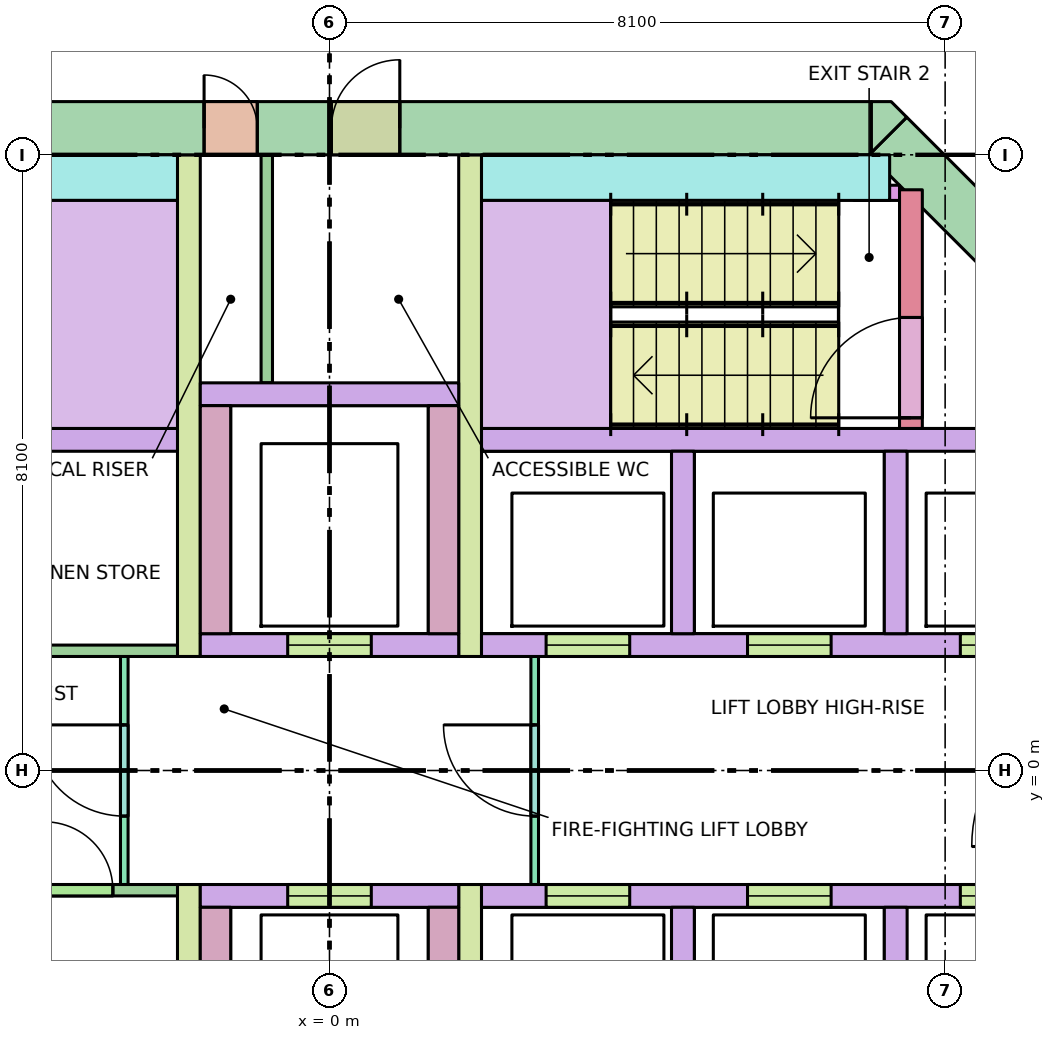
"""IFC4 building model, lengths in metres.
Left out: names, types, materials, properties, quantities, classifications, styles, units other than length and angle.
Written with IfcOpenShell. Run it as: python <this file> out.ifc"""

import sys

from ifc_helpers import new_model, si_unit, direction, frame, frame_2d, origin, place, context, subcontext, project, spatial, polyline, rectangle, outline, extrude, element, fill, save


model = new_model("IFC4")
c1 = context("Model", 3, precision=1e-05, world=origin(), true_north=direction((0.0, 1.0)))
c2 = subcontext(c1, "Body", "Model", "MODEL_VIEW")
j1 = project(units=[si_unit("LENGTHUNIT", "METRE"), si_unit("PLANEANGLEUNIT", "RADIAN")], contexts=[c1])
p1 = place(None, origin())
s1 = spatial("IfcSite", under=j1, at=p1, CompositionType="ELEMENT")
p2 = place(p1, origin())
s2 = spatial("IfcBuilding", under=s1, at=p2, CompositionType="ELEMENT")
p3 = place(p2, frame((0.0, 0.0, 226.1)))
s3 = spatial("IfcBuildingStorey", under=s2, at=p3, CompositionType="ELEMENT", Elevation=226.1)
p4 = place(p3, frame((-7.13, 8.45, -0.28), z_axis=(0.0, 0.0, 1.0), x_axis=(1.0, 0.0, 0.0)))
e1 = element("IfcWall", 1, at=p4, inside=s3, PredefinedType="SHEAR", context=c2, shape_type="SweptSolid", body=[
    extrude(rectangle(XDim=14.26, YDim=0.7, at=frame_2d((7.13, 0.0))), origin(), (0.0, 0.0, 1.0), 3.7),
])
p5 = place(p4, frame((5.48, 0.0, 0.28)))
e2 = element("IfcOpeningElement", 2, at=p5, cuts=e1, PredefinedType="OPENING", context=c2, shape_type="SweptSolid", body=[
    extrude(rectangle(XDim=0.7, YDim=2.1, at=frame_2d((0.35, 1.05))), frame((0.0, 0.36, 0.0), z_axis=(0.0, -1.0, 0.0), x_axis=(1.0, 0.0, 0.0)), (0.0, 0.0, 1.0), 0.72),
])
p6 = place(p4, frame((7.155, 0.0, 0.28)))
e3 = element("IfcOpeningElement", 3, at=p6, cuts=e1, PredefinedType="OPENING", context=c2, shape_type="SweptSolid", body=[
    extrude(rectangle(XDim=0.9, YDim=2.1, at=frame_2d((0.45, 1.05))), frame((0.0, 0.36, 0.0), z_axis=(0.0, -1.0, 0.0), x_axis=(1.0, 0.0, 0.0)), (0.0, 0.0, 1.0), 0.72),
])
p7 = place(p3, frame((7.347, 8.347, -0.28), z_axis=(0.0, 0.0, 1.0), x_axis=(0.707106781187, -0.707106781187, 0.0)))
e4 = element("IfcWall", 4, at=p7, inside=s3, PredefinedType="SHEAR", context=c2, shape_type="SweptSolid", body=[
    extrude(rectangle(XDim=4.243, YDim=0.7, at=frame_2d((2.121, 0.0))), origin(), (0.0, 0.0, 1.0), 3.7),
])
p8 = place(p7, frame((2.393, 0.0, 0.28)))
e5 = element("IfcOpeningElement", 5, at=p8, cuts=e4, PredefinedType="OPENING", context=c2, shape_type="SweptSolid", body=[
    extrude(rectangle(XDim=1.2, YDim=2.1, at=frame_2d((0.6, 1.05))), frame((0.0, 0.36, 0.0), z_axis=(0.0, -1.0, 0.0), x_axis=(1.0, 0.0, 0.0)), (0.0, 0.0, 1.0), 0.72),
])
p9 = place(p3, frame((0.0, 0.0, -0.28)))
e6 = element("IfcWall", 6, at=p9, inside=s3, PredefinedType="SHEAR", context=c2, shape_type="SweptSolid", body=[
    extrude(outline(polyline([(7.39, 8.8), (7.595, 8.595), (7.595, 8.595), (7.595, 8.595), (7.13, 8.13), (7.13, 8.8), (7.13, 8.8), (7.39, 8.8)])), origin(), (0.0, 0.0, 1.0), 3.7),
])
for number, where, z_axis, x_axis in (
    (7, (-10.1, 4.35, 0.0), (0.0, 0.0, 1.0), (1.0, 0.0, 0.0)),
    (8, (2.0, 4.35, 0.0), (0.0, 0.0, 1.0), (1.0, 0.0, 0.0)),
):
    element("IfcWall", number, at=place(p3, frame(where, z_axis=z_axis, x_axis=x_axis)), inside=s3, PredefinedType="SOLIDWALL", context=c2, shape_type="SweptSolid", body=[
        extrude(rectangle(XDim=8.1, YDim=0.3, at=frame_2d((4.05, 0.0))), origin(), (0.0, 0.0, 1.0), 3.42),
    ])
p10 = place(p3, frame((2.0, 1.65, 0.0), z_axis=(0.0, 0.0, 1.0), x_axis=(1.0, 0.0, 0.0)))
e9 = element("IfcWall", 9, at=p10, inside=s3, PredefinedType="SOLIDWALL", context=c2, shape_type="SweptSolid", body=[
    extrude(rectangle(XDim=8.1, YDim=0.3, at=frame_2d((4.05, 0.0))), origin(), (0.0, 0.0, 1.0), 3.42),
])
p11 = place(p10, frame((0.85, 0.0, 0.0)))
e10 = element("IfcOpeningElement", 10, at=p11, cuts=e9, PredefinedType="OPENING", context=c2, shape_type="SweptSolid", body=[
    extrude(rectangle(XDim=1.1, YDim=2.1, at=frame_2d((0.55, 1.05))), frame((0.0, 0.16, 0.0), z_axis=(0.0, -1.0, 0.0), x_axis=(1.0, 0.0, 0.0)), (0.0, 0.0, 1.0), 0.32),
])
p12 = place(p10, frame((3.5, 0.0, 0.0)))
e11 = element("IfcOpeningElement", 11, at=p12, cuts=e9, PredefinedType="OPENING", context=c2, shape_type="SweptSolid", body=[
    extrude(rectangle(XDim=1.1, YDim=2.1, at=frame_2d((0.55, 1.05))), frame((0.0, 0.16, 0.0), z_axis=(0.0, -1.0, 0.0), x_axis=(1.0, 0.0, 0.0)), (0.0, 0.0, 1.0), 0.32),
])
p13 = place(p10, frame((6.3, 0.0, 0.0)))
e12 = element("IfcOpeningElement", 12, at=p13, cuts=e9, PredefinedType="OPENING", context=c2, shape_type="SweptSolid", body=[
    extrude(rectangle(XDim=1.1, YDim=2.1, at=frame_2d((0.55, 1.05))), frame((0.0, 0.16, 0.0), z_axis=(0.0, -1.0, 0.0), x_axis=(1.0, 0.0, 0.0)), (0.0, 0.0, 1.0), 0.32),
])
p14 = place(p3, frame((2.0, -1.65, 0.0), z_axis=(0.0, 0.0, 1.0), x_axis=(1.0, 0.0, 0.0)))
e13 = element("IfcWall", 13, at=p14, inside=s3, PredefinedType="SOLIDWALL", context=c2, shape_type="SweptSolid", body=[
    extrude(rectangle(XDim=8.1, YDim=0.3, at=frame_2d((4.05, 0.0))), origin(), (0.0, 0.0, 1.0), 3.42),
])
p15 = place(p14, frame((0.85, 0.0, 0.0)))
e14 = element("IfcOpeningElement", 14, at=p15, cuts=e13, PredefinedType="OPENING", context=c2, shape_type="SweptSolid", body=[
    extrude(rectangle(XDim=1.1, YDim=2.1, at=frame_2d((0.55, 1.05))), frame((0.0, 0.16, 0.0), z_axis=(0.0, -1.0, 0.0), x_axis=(1.0, 0.0, 0.0)), (0.0, 0.0, 1.0), 0.32),
])
p16 = place(p14, frame((3.5, 0.0, 0.0)))
e15 = element("IfcOpeningElement", 15, at=p16, cuts=e13, PredefinedType="OPENING", context=c2, shape_type="SweptSolid", body=[
    extrude(rectangle(XDim=1.1, YDim=2.1, at=frame_2d((0.55, 1.05))), frame((0.0, 0.16, 0.0), z_axis=(0.0, -1.0, 0.0), x_axis=(1.0, 0.0, 0.0)), (0.0, 0.0, 1.0), 0.32),
])
p17 = place(p14, frame((6.3, 0.0, 0.0)))
e16 = element("IfcOpeningElement", 16, at=p17, cuts=e13, PredefinedType="OPENING", context=c2, shape_type="SweptSolid", body=[
    extrude(rectangle(XDim=1.1, YDim=2.1, at=frame_2d((0.55, 1.05))), frame((0.0, 0.16, 0.0), z_axis=(0.0, -1.0, 0.0), x_axis=(1.0, 0.0, 0.0)), (0.0, 0.0, 1.0), 0.32),
])
for number, where, z_axis, x_axis in (
    (17, (4.65, 1.8, 0.0), (0.0, 0.0, 1.0), (0.0, 1.0, 0.0)),
    (18, (4.65, -4.2, 0.0), (0.0, 0.0, 1.0), (0.0, 1.0, 0.0)),
    (19, (7.45, 1.8, 0.0), (0.0, 0.0, 1.0), (0.0, 1.0, 0.0)),
    (20, (7.45, -4.2, 0.0), (0.0, 0.0, 1.0), (0.0, 1.0, 0.0)),
):
    element("IfcWall", number, at=place(p3, frame(where, z_axis=z_axis, x_axis=x_axis)), inside=s3, PredefinedType="SOLIDWALL", context=c2, shape_type="SweptSolid", body=[
        extrude(rectangle(XDim=2.4, YDim=0.3, at=frame_2d((1.2, 0.0))), origin(), (0.0, 0.0, 1.0), 3.42),
    ])
for number, where, z_axis, x_axis in (
    (21, (-1.85, 1.5, 0.0), (0.0, 0.0, 1.0), (0.0, 1.0, 0.0)),
    (22, (-1.85, -8.1, 0.0), (0.0, 0.0, 1.0), (0.0, 1.0, 0.0)),
    (23, (1.85, 1.5, 0.0), (0.0, 0.0, 1.0), (0.0, 1.0, 0.0)),
    (24, (1.85, -8.1, 0.0), (0.0, 0.0, 1.0), (0.0, 1.0, 0.0)),
):
    element("IfcWall", number, at=place(p3, frame(where, z_axis=z_axis, x_axis=x_axis)), inside=s3, PredefinedType="SHEAR", context=c2, shape_type="SweptSolid", body=[
        extrude(rectangle(XDim=6.6, YDim=0.3, at=frame_2d((3.3, 0.0))), origin(), (0.0, 0.0, 1.0), 3.42),
    ])
p18 = place(p3, frame((-1.7, 1.65, 0.0), z_axis=(0.0, 0.0, 1.0), x_axis=(1.0, 0.0, 0.0)))
e25 = element("IfcWall", 25, at=p18, inside=s3, PredefinedType="SOLIDWALL", context=c2, shape_type="SweptSolid", body=[
    extrude(rectangle(XDim=3.4, YDim=0.3, at=frame_2d((1.7, 0.0))), origin(), (0.0, 0.0, 1.0), 3.42),
])
p19 = place(p18, frame((1.15, 0.0, 0.0)))
e26 = element("IfcOpeningElement", 26, at=p19, cuts=e25, PredefinedType="OPENING", context=c2, shape_type="SweptSolid", body=[
    extrude(rectangle(XDim=1.1, YDim=2.1, at=frame_2d((0.55, 1.05))), frame((0.0, 0.16, 0.0), z_axis=(0.0, -1.0, 0.0), x_axis=(1.0, 0.0, 0.0)), (0.0, 0.0, 1.0), 0.32),
])
p20 = place(p3, frame((-1.7, -1.65, 0.0), z_axis=(0.0, 0.0, 1.0), x_axis=(1.0, 0.0, 0.0)))
e27 = element("IfcWall", 27, at=p20, inside=s3, PredefinedType="SOLIDWALL", context=c2, shape_type="SweptSolid", body=[
    extrude(rectangle(XDim=3.4, YDim=0.3, at=frame_2d((1.7, 0.0))), origin(), (0.0, 0.0, 1.0), 3.42),
])
p21 = place(p20, frame((1.15, 0.0, 0.0)))
e28 = element("IfcOpeningElement", 28, at=p21, cuts=e27, PredefinedType="OPENING", context=c2, shape_type="SweptSolid", body=[
    extrude(rectangle(XDim=1.1, YDim=2.1, at=frame_2d((0.55, 1.05))), frame((0.0, 0.16, 0.0), z_axis=(0.0, -1.0, 0.0), x_axis=(1.0, 0.0, 0.0)), (0.0, 0.0, 1.0), 0.32),
])
for number, where, z_axis, x_axis in (
    (29, (-1.5, 1.8, 0.0), (0.0, 0.0, 1.0), (0.0, 1.0, 0.0)),
    (30, (-1.5, -4.8, 0.0), (0.0, 0.0, 1.0), (0.0, 1.0, 0.0)),
    (31, (1.5, 1.8, 0.0), (0.0, 0.0, 1.0), (0.0, 1.0, 0.0)),
    (32, (1.5, -4.8, 0.0), (0.0, 0.0, 1.0), (0.0, 1.0, 0.0)),
):
    element("IfcWall", number, at=place(p3, frame(where, z_axis=z_axis, x_axis=x_axis)), inside=s3, PredefinedType="SOLIDWALL", context=c2, shape_type="SweptSolid", body=[
        extrude(rectangle(XDim=3.0, YDim=0.4, at=frame_2d((1.5, 0.0))), origin(), (0.0, 0.0, 1.0), 3.42),
    ])
p22 = place(p3, frame((-1.7, 4.95, 0.0), z_axis=(0.0, 0.0, 1.0), x_axis=(1.0, 0.0, 0.0)))
e33 = element("IfcWall", 33, at=p22, inside=s3, PredefinedType="SOLIDWALL", context=c2, shape_type="SweptSolid", body=[
    extrude(rectangle(XDim=3.4, YDim=0.3, at=frame_2d((1.7, 0.0))), origin(), (0.0, 0.0, 1.0), 3.42),
])
p23 = place(p3, frame((-7.37, 7.8, 0.0), z_axis=(0.0, 0.0, 1.0), x_axis=(1.0, 0.0, 0.0)))
e34 = element("IfcWall", 34, at=p23, inside=s3, PredefinedType="SHEAR", context=c2, shape_type="SweptSolid", body=[
    extrude(rectangle(XDim=5.37, YDim=0.6, at=frame_2d((2.685, 0.0))), origin(), (0.0, 0.0, 1.0), 3.42),
])
p24 = place(p3, frame((7.65, 4.5, 0.0), z_axis=(0.0, 0.0, 1.0), x_axis=(0.0, 1.0, 0.0)))
e35 = element("IfcWall", 35, at=p24, inside=s3, PredefinedType="SHEAR", context=c2, shape_type="SweptSolid", body=[
    extrude(rectangle(XDim=3.14, YDim=0.3, at=frame_2d((1.57, 0.0))), origin(), (0.0, 0.0, 1.0), 3.42),
])
p25 = place(p24, frame((0.14, 0.0, 0.0)))
e36 = element("IfcOpeningElement", 36, at=p25, cuts=e35, PredefinedType="OPENING", context=c2, shape_type="SweptSolid", body=[
    extrude(rectangle(XDim=1.32, YDim=2.1, at=frame_2d((0.66, 1.05))), frame((0.0, 0.16, 0.0), z_axis=(0.0, -1.0, 0.0), x_axis=(1.0, 0.0, 0.0)), (0.0, 0.0, 1.0), 0.32),
])
p26 = place(p3, frame((2.0, 7.8, 0.0), z_axis=(0.0, 0.0, 1.0), x_axis=(1.0, 0.0, 0.0)))
e37 = element("IfcWall", 37, at=p26, inside=s3, PredefinedType="SHEAR", context=c2, shape_type="SweptSolid", body=[
    extrude(rectangle(XDim=5.37, YDim=0.6, at=frame_2d((2.685, 0.0))), origin(), (0.0, 0.0, 1.0), 3.42),
])
p27 = place(p3, frame((6.9, 7.6, 0.0), z_axis=(0.0, 0.0, 1.0), x_axis=(1.0, 0.0, 0.0)))
e38 = element("IfcWall", 38, at=p27, inside=s3, PredefinedType="SHEAR", context=c2, shape_type="SweptSolid", body=[
    extrude(rectangle(XDim=0.6, YDim=0.2, at=frame_2d((0.3, 0.0))), origin(), (0.0, 0.0, 1.0), 3.42),
])
p28 = place(p3, frame((-2.7, -1.5, 0.0), z_axis=(0.0, 0.0, 1.0), x_axis=(0.0, 1.0, 0.0)))
e39 = element("IfcWall", 39, at=p28, inside=s3, PredefinedType="PARTITIONING", context=c2, shape_type="SweptSolid", body=[
    extrude(rectangle(XDim=3.0, YDim=0.1, at=frame_2d((1.5, 0.0))), origin(), (0.0, 0.0, 1.0), 3.42),
])
p29 = place(p28, frame((0.9, 0.0, 0.0)))
e40 = element("IfcOpeningElement", 40, at=p29, cuts=e39, PredefinedType="OPENING", context=c2, shape_type="SweptSolid", body=[
    extrude(rectangle(XDim=1.2, YDim=2.1, at=frame_2d((0.6, 1.05))), frame((0.0, 0.06, 0.0), z_axis=(0.0, -1.0, 0.0), x_axis=(1.0, 0.0, 0.0)), (0.0, 0.0, 1.0), 0.12),
])
p30 = place(p3, frame((2.7, -1.5, 0.0), z_axis=(0.0, 0.0, 1.0), x_axis=(0.0, 1.0, 0.0)))
e41 = element("IfcWall", 41, at=p30, inside=s3, PredefinedType="PARTITIONING", context=c2, shape_type="SweptSolid", body=[
    extrude(rectangle(XDim=3.0, YDim=0.1, at=frame_2d((1.5, 0.0))), origin(), (0.0, 0.0, 1.0), 3.42),
])
p31 = place(p30, frame((0.9, 0.0, 0.0)))
e42 = element("IfcOpeningElement", 42, at=p31, cuts=e41, PredefinedType="OPENING", context=c2, shape_type="SweptSolid", body=[
    extrude(rectangle(XDim=1.2, YDim=2.1, at=frame_2d((0.6, 1.05))), frame((0.0, 0.06, 0.0), z_axis=(0.0, -1.0, 0.0), x_axis=(1.0, 0.0, 0.0)), (0.0, 0.0, 1.0), 0.12),
])
p32 = place(p3, frame((-0.825, 5.1, 0.0), z_axis=(0.0, 0.0, 1.0), x_axis=(0.0, 1.0, 0.0)))
e43 = element("IfcWall", 43, at=p32, inside=s3, PredefinedType="PARTITIONING", context=c2, shape_type="SweptSolid", body=[
    extrude(rectangle(XDim=3.0, YDim=0.15, at=frame_2d((1.5, 0.0))), origin(), (0.0, 0.0, 1.0), 3.42),
])
p33 = place(p3, frame((-10.1, 1.575, 0.0), z_axis=(0.0, 0.0, 1.0), x_axis=(1.0, 0.0, 0.0)))
e44 = element("IfcWall", 44, at=p33, inside=s3, PredefinedType="PARTITIONING", context=c2, shape_type="SweptSolid", body=[
    extrude(rectangle(XDim=8.1, YDim=0.15, at=frame_2d((4.05, 0.0))), origin(), (0.0, 0.0, 1.0), 3.42),
])
p34 = place(p33, frame((0.941, 0.0, 0.0)))
e45 = element("IfcOpeningElement", 45, at=p34, cuts=e44, PredefinedType="OPENING", context=c2, shape_type="SweptSolid", body=[
    extrude(rectangle(XDim=0.9, YDim=2.1, at=frame_2d((0.45, 1.05))), frame((0.0, 0.085, 0.0), z_axis=(0.0, -1.0, 0.0), x_axis=(1.0, 0.0, 0.0)), (0.0, 0.0, 1.0), 0.17),
])
p35 = place(p33, frame((5.066, 0.0, 0.0)))
e46 = element("IfcOpeningElement", 46, at=p35, cuts=e44, PredefinedType="OPENING", context=c2, shape_type="SweptSolid", body=[
    extrude(rectangle(XDim=0.9, YDim=2.1, at=frame_2d((0.45, 1.05))), frame((0.0, 0.085, 0.0), z_axis=(0.0, -1.0, 0.0), x_axis=(1.0, 0.0, 0.0)), (0.0, 0.0, 1.0), 0.17),
])
p36 = place(p3, frame((-10.1, -1.575, 0.0), z_axis=(0.0, 0.0, 1.0), x_axis=(1.0, 0.0, 0.0)))
e47 = element("IfcWall", 47, at=p36, inside=s3, PredefinedType="PARTITIONING", context=c2, shape_type="SweptSolid", body=[
    extrude(rectangle(XDim=8.1, YDim=0.15, at=frame_2d((4.05, 0.0))), origin(), (0.0, 0.0, 1.0), 3.42),
])
p37 = place(p36, frame((2.333, 0.0, 0.0)))
e48 = element("IfcOpeningElement", 48, at=p37, cuts=e47, PredefinedType="OPENING", context=c2, shape_type="SweptSolid", body=[
    extrude(rectangle(XDim=0.9, YDim=2.1, at=frame_2d((0.45, 1.05))), frame((0.0, 0.085, 0.0), z_axis=(0.0, -1.0, 0.0), x_axis=(1.0, 0.0, 0.0)), (0.0, 0.0, 1.0), 0.17),
])
p38 = place(p36, frame((6.35, 0.0, 0.0)))
e49 = element("IfcOpeningElement", 49, at=p38, cuts=e47, PredefinedType="OPENING", context=c2, shape_type="SweptSolid", body=[
    extrude(rectangle(XDim=0.9, YDim=2.1, at=frame_2d((0.45, 1.05))), frame((0.0, 0.085, 0.0), z_axis=(0.0, -1.0, 0.0), x_axis=(1.0, 0.0, 0.0)), (0.0, 0.0, 1.0), 0.17),
])
p39 = place(p3, frame((8.204, 10.638, 0.0), z_axis=(0.0, 0.0, 1.0), x_axis=(0.707106781187, -0.707106781187, 0.0)))
e50 = element("IfcWall", 50, at=p39, inside=s3, PredefinedType="PARTITIONING", context=c2, shape_type="SweptSolid", body=[
    extrude(rectangle(XDim=6.271, YDim=0.15, at=frame_2d((3.135, 0.0))), origin(), (0.0, 0.0, 1.0), 2.57),
])
p40 = place(p39, frame((3.057, 0.0, 0.0)))
e51 = element("IfcOpeningElement", 51, at=p40, cuts=e50, PredefinedType="OPENING", context=c2, shape_type="SweptSolid", body=[
    extrude(rectangle(XDim=0.9, YDim=2.1, at=frame_2d((0.45, 1.05))), frame((0.0, 0.085, 0.0), z_axis=(0.0, -1.0, 0.0), x_axis=(1.0, 0.0, 0.0)), (0.0, 0.0, 1.0), 0.17),
])
p41 = place(p39, frame((0.436, 0.0, 0.0)))
e52 = element("IfcOpeningElement", 52, at=p41, cuts=e50, PredefinedType="OPENING", context=c2, shape_type="SweptSolid", body=[
    extrude(rectangle(XDim=0.9, YDim=2.1, at=frame_2d((0.45, 1.05))), frame((0.0, 0.085, 0.0), z_axis=(0.0, -1.0, 0.0), x_axis=(1.0, 0.0, 0.0)), (0.0, 0.0, 1.0), 0.17),
])
p42 = place(p11, origin())
e53 = element("IfcDoor", 53, at=p42, inside=s3, OperationType="DOUBLE_DOOR_SLIDING", PredefinedType="DOOR", context=c2, shape_type="SweptSolid", body=[
    extrude(rectangle(XDim=1.1, YDim=2.1, at=frame_2d((0.55, 1.05))), frame((0.0, 0.025, 0.0), z_axis=(0.0, -1.0, 0.0), x_axis=(1.0, 0.0, 0.0)), (0.0, 0.0, 1.0), 0.05),
])
fill(e10, e53)
p43 = place(p12, origin())
e54 = element("IfcDoor", 54, at=p43, inside=s3, OperationType="DOUBLE_DOOR_SLIDING", PredefinedType="DOOR", context=c2, shape_type="SweptSolid", body=[
    extrude(rectangle(XDim=1.1, YDim=2.1, at=frame_2d((0.55, 1.05))), frame((0.0, 0.025, 0.0), z_axis=(0.0, -1.0, 0.0), x_axis=(1.0, 0.0, 0.0)), (0.0, 0.0, 1.0), 0.05),
])
fill(e11, e54)
p44 = place(p13, origin())
e55 = element("IfcDoor", 55, at=p44, inside=s3, OperationType="DOUBLE_DOOR_SLIDING", PredefinedType="DOOR", context=c2, shape_type="SweptSolid", body=[
    extrude(rectangle(XDim=1.1, YDim=2.1, at=frame_2d((0.55, 1.05))), frame((0.0, 0.025, 0.0), z_axis=(0.0, -1.0, 0.0), x_axis=(1.0, 0.0, 0.0)), (0.0, 0.0, 1.0), 0.05),
])
fill(e12, e55)
p45 = place(p15, origin())
e56 = element("IfcDoor", 56, at=p45, inside=s3, OperationType="DOUBLE_DOOR_SLIDING", PredefinedType="DOOR", context=c2, shape_type="SweptSolid", body=[
    extrude(rectangle(XDim=1.1, YDim=2.1, at=frame_2d((0.55, 1.05))), frame((0.0, 0.025, 0.0), z_axis=(0.0, -1.0, 0.0), x_axis=(1.0, 0.0, 0.0)), (0.0, 0.0, 1.0), 0.05),
])
fill(e14, e56)
p46 = place(p16, origin())
e57 = element("IfcDoor", 57, at=p46, inside=s3, OperationType="DOUBLE_DOOR_SLIDING", PredefinedType="DOOR", context=c2, shape_type="SweptSolid", body=[
    extrude(rectangle(XDim=1.1, YDim=2.1, at=frame_2d((0.55, 1.05))), frame((0.0, 0.025, 0.0), z_axis=(0.0, -1.0, 0.0), x_axis=(1.0, 0.0, 0.0)), (0.0, 0.0, 1.0), 0.05),
])
fill(e15, e57)
p47 = place(p17, origin())
e58 = element("IfcDoor", 58, at=p47, inside=s3, OperationType="DOUBLE_DOOR_SLIDING", PredefinedType="DOOR", context=c2, shape_type="SweptSolid", body=[
    extrude(rectangle(XDim=1.1, YDim=2.1, at=frame_2d((0.55, 1.05))), frame((0.0, 0.025, 0.0), z_axis=(0.0, -1.0, 0.0), x_axis=(1.0, 0.0, 0.0)), (0.0, 0.0, 1.0), 0.05),
])
fill(e16, e58)
p48 = place(p19, origin())
e59 = element("IfcDoor", 59, at=p48, inside=s3, OperationType="DOUBLE_DOOR_SLIDING", PredefinedType="DOOR", context=c2, shape_type="SweptSolid", body=[
    extrude(rectangle(XDim=1.1, YDim=2.1, at=frame_2d((0.55, 1.05))), frame((0.0, 0.025, 0.0), z_axis=(0.0, -1.0, 0.0), x_axis=(1.0, 0.0, 0.0)), (0.0, 0.0, 1.0), 0.05),
])
fill(e26, e59)
p49 = place(p21, origin())
e60 = element("IfcDoor", 60, at=p49, inside=s3, OperationType="DOUBLE_DOOR_SLIDING", PredefinedType="DOOR", context=c2, shape_type="SweptSolid", body=[
    extrude(rectangle(XDim=1.1, YDim=2.1, at=frame_2d((0.55, 1.05))), frame((0.0, 0.025, 0.0), z_axis=(0.0, -1.0, 0.0), x_axis=(1.0, 0.0, 0.0)), (0.0, 0.0, 1.0), 0.05),
])
fill(e28, e60)
p50 = place(p25, origin())
e61 = element("IfcDoor", 61, at=p50, inside=s3, OperationType="DOUBLE_DOOR_SINGLE_SWING", PredefinedType="DOOR", context=c2, shape_type="SweptSolid", body=[
    extrude(rectangle(XDim=1.32, YDim=2.1, at=frame_2d((0.66, 1.05))), frame((0.0, 0.025, 0.0), z_axis=(0.0, -1.0, 0.0), x_axis=(1.0, 0.0, 0.0)), (0.0, 0.0, 1.0), 0.05),
])
fill(e36, e61)
p51 = place(p29, origin())
e62 = element("IfcDoor", 62, at=p51, inside=s3, OperationType="SINGLE_SWING_RIGHT", PredefinedType="DOOR", context=c2, shape_type="SweptSolid", body=[
    extrude(rectangle(XDim=1.2, YDim=2.1, at=frame_2d((0.6, 1.05))), frame((0.0, 0.025, 0.0), z_axis=(0.0, -1.0, 0.0), x_axis=(1.0, 0.0, 0.0)), (0.0, 0.0, 1.0), 0.05),
])
fill(e40, e62)
p52 = place(p31, origin())
e63 = element("IfcDoor", 63, at=p52, inside=s3, OperationType="SINGLE_SWING_RIGHT", PredefinedType="DOOR", context=c2, shape_type="SweptSolid", body=[
    extrude(rectangle(XDim=1.2, YDim=2.1, at=frame_2d((0.6, 1.05))), frame((0.0, 0.025, 0.0), z_axis=(0.0, -1.0, 0.0), x_axis=(1.0, 0.0, 0.0)), (0.0, 0.0, 1.0), 0.05),
])
fill(e42, e63)
p53 = place(p5, origin())
e64 = element("IfcDoor", 64, at=p53, inside=s3, OperationType="SINGLE_SWING_LEFT", PredefinedType="DOOR", context=c2, shape_type="SweptSolid", body=[
    extrude(rectangle(XDim=0.7, YDim=2.1, at=frame_2d((0.35, 1.05))), frame((0.0, 0.025, 0.0), z_axis=(0.0, -1.0, 0.0), x_axis=(1.0, 0.0, 0.0)), (0.0, 0.0, 1.0), 0.05),
])
fill(e2, e64)
p54 = place(p6, origin())
e65 = element("IfcDoor", 65, at=p54, inside=s3, OperationType="SINGLE_SWING_RIGHT", PredefinedType="DOOR", context=c2, shape_type="SweptSolid", body=[
    extrude(rectangle(XDim=0.9, YDim=2.1, at=frame_2d((0.45, 1.05))), frame((0.0, 0.025, 0.0), z_axis=(0.0, -1.0, 0.0), x_axis=(1.0, 0.0, 0.0)), (0.0, 0.0, 1.0), 0.05),
])
fill(e3, e65)
p55 = place(p38, origin())
e66 = element("IfcDoor", 66, at=p55, inside=s3, OperationType="SINGLE_SWING_LEFT", PredefinedType="DOOR", context=c2, shape_type="SweptSolid", body=[
    extrude(rectangle(XDim=0.9, YDim=2.1, at=frame_2d((0.45, 1.05))), frame((0.0, 0.025, 0.0), z_axis=(0.0, -1.0, 0.0), x_axis=(1.0, 0.0, 0.0)), (0.0, 0.0, 1.0), 0.05),
])
fill(e49, e66)
save(model, sys.argv[1])
